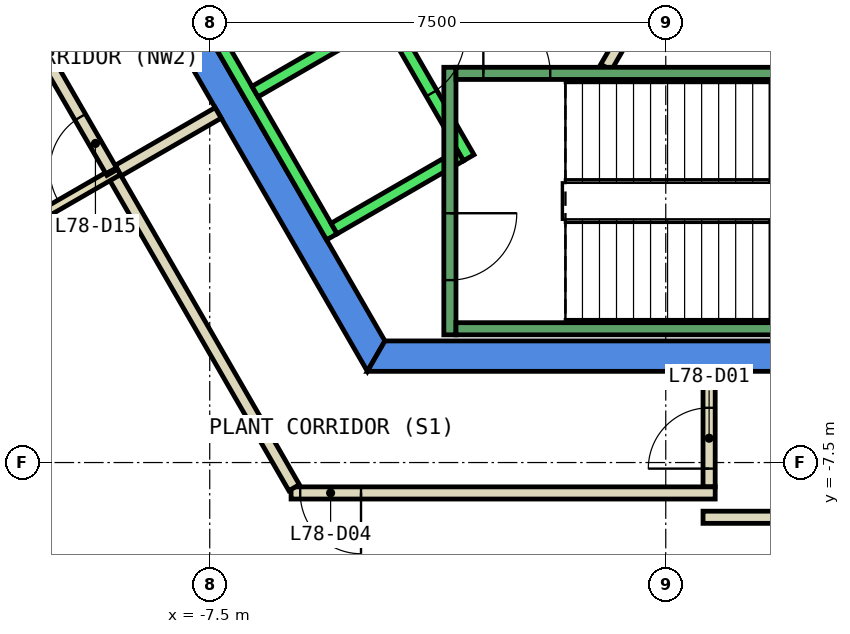
"""IFC4 building model, lengths in metres.
Left out: names, types, materials, properties, quantities, classifications, styles, units other than length and angle.
Written with IfcOpenShell. Run it as: python <this file> out.ifc"""

import sys

from ifc_helpers import new_model, si_unit, direction, frame, frame_2d, origin, place, context, subcontext, project, spatial, polyline, rectangle, outline, extrude, element, fill, save


model = new_model("IFC4")
c1 = context("Model", 3, precision=1e-05, world=origin(), true_north=direction((0.0, 1.0)))
c2 = subcontext(c1, "Body", "Model", "MODEL_VIEW")
j1 = project(units=[si_unit("LENGTHUNIT", "METRE"), si_unit("PLANEANGLEUNIT", "RADIAN")], contexts=[c1])
p1 = place(None, origin())
s1 = spatial("IfcSite", under=j1, at=p1, CompositionType="ELEMENT")
p2 = place(p1, origin())
s2 = spatial("IfcBuilding", under=s1, at=p2, CompositionType="ELEMENT")
p3 = place(p2, frame((0.0, 0.0, 331.4)))
s3 = spatial("IfcBuildingStorey", under=s2, at=p3, CompositionType="ELEMENT", Elevation=331.4)
p4 = place(p3, frame((0.0, 0.0, -0.45)))
e1 = element("IfcWall", 1, at=p4, inside=s3, PredefinedType="SHEAR", context=c2, shape_type="SweptSolid", body=[
    extrude(outline(polyline([(-9.815, 2.5), (-4.907, -6.0), (-4.619, -5.5), (-9.238, 2.5), (-9.815, 2.5)])), origin(), (0.0, 0.0, 1.0), 4.6),
])
p5 = place(p3, frame((0.0, 0.0, -0.45)))
e2 = element("IfcWall", 2, at=p5, inside=s3, PredefinedType="SHEAR", context=c2, shape_type="SweptSolid", body=[
    extrude(outline(polyline([(3.75, -6.0), (3.75, -5.5), (-4.619, -5.5), (-4.907, -6.0), (3.75, -6.0)])), origin(), (0.0, 0.0, 1.0), 4.6),
])
p6 = place(p3, frame((-0.982, -1.0, 0.0), z_axis=(0.0, 0.0, 1.0), x_axis=(0.50024047865, 0.865886518847, 0.0)))
e3 = element("IfcWall", 3, at=p6, inside=s3, PredefinedType="PARTITIONING", context=c2, shape_type="SweptSolid", body=[
    extrude(rectangle(XDim=1.863, YDim=0.2, at=frame_2d((0.931, 0.0))), origin(), (0.0, 0.0, 1.0), 4.15),
])
p7 = place(p3, frame((0.713, -7.9, 0.0), z_axis=(0.0, 0.0, 1.0), x_axis=(0.0, 1.0, 0.0)))
e4 = element("IfcWall", 4, at=p7, inside=s3, PredefinedType="PARTITIONING", context=c2, shape_type="SweptSolid", body=[
    extrude(rectangle(XDim=1.9, YDim=0.2, at=frame_2d((0.95, 0.0))), origin(), (0.0, 0.0, 1.0), 4.15),
])
p8 = place(p7, frame((0.3, 0.0, 0.0)))
e5 = element("IfcOpeningElement", 5, at=p8, cuts=e4, PredefinedType="OPENING", context=c2, shape_type="SweptSolid", body=[
    extrude(rectangle(XDim=1.0, YDim=2.1, at=frame_2d((0.5, 1.05))), frame((0.0, 0.11, 0.0), z_axis=(0.0, -1.0, 0.0), x_axis=(1.0, 0.0, 0.0)), (0.0, 0.0, 1.0), 0.22),
])
p9 = place(p3, frame((2.042, -8.4, 0.0), z_axis=(0.0, 0.0, 1.0), x_axis=(-1.0, 0.0, 0.0)))
e6 = element("IfcWall", 6, at=p9, inside=s3, PredefinedType="PARTITIONING", context=c2, shape_type="SweptSolid", body=[
    extrude(rectangle(XDim=1.429, YDim=0.2, at=frame_2d((0.714, 0.0))), origin(), (0.0, 0.0, 1.0), 4.15),
])
p10 = place(p3, frame((0.813, -8.0, 0.0), z_axis=(0.0, 0.0, 1.0), x_axis=(-1.0, 0.0, 0.0)))
e7 = element("IfcWall", 7, at=p10, inside=s3, PredefinedType="PARTITIONING", context=c2, shape_type="SweptSolid", body=[
    extrude(rectangle(XDim=6.975, YDim=0.2, at=frame_2d((3.488, 0.0))), origin(), (0.0, 0.0, 1.0), 4.15),
])
p11 = place(p10, frame((5.825, 0.0, 0.0)))
e8 = element("IfcOpeningElement", 8, at=p11, cuts=e7, PredefinedType="OPENING", context=c2, shape_type="SweptSolid", body=[
    extrude(rectangle(XDim=1.0, YDim=2.1, at=frame_2d((0.5, 1.05))), frame((0.0, 0.11, 0.0), z_axis=(0.0, -1.0, 0.0), x_axis=(1.0, 0.0, 0.0)), (0.0, 0.0, 1.0), 0.22),
])
p12 = place(p3, frame((-6.112, -7.913, 0.0), z_axis=(0.0, 0.0, 1.0), x_axis=(-0.499915430684, 0.866074224396, 0.0)))
e9 = element("IfcWall", 9, at=p12, inside=s3, PredefinedType="PARTITIONING", context=c2, shape_type="SweptSolid", body=[
    extrude(rectangle(XDim=5.987, YDim=0.2, at=frame_2d((2.993, 0.0))), origin(), (0.0, 0.0, 1.0), 4.15),
])
p13 = place(p3, frame((-9.006, -2.7, 0.0), z_axis=(0.0, 0.0, 1.0), x_axis=(0.865980106173, 0.500078449558, 0.0)))
e10 = element("IfcWall", 10, at=p13, inside=s3, PredefinedType="PARTITIONING", context=c2, shape_type="SweptSolid", body=[
    extrude(rectangle(XDim=1.9, YDim=0.2, at=frame_2d((0.95, 0.0))), origin(), (0.0, 0.0, 1.0), 4.15),
])
p14 = place(p3, frame((-21.68, -10.018, 0.0), z_axis=(0.0, 0.0, 1.0), x_axis=(0.865999449672, 0.500044951147, 0.0)))
e11 = element("IfcWall", 11, at=p14, inside=s3, PredefinedType="PARTITIONING", context=c2, shape_type="SweptSolid", body=[
    extrude(rectangle(XDim=14.635, YDim=0.15, at=frame_2d((7.317, 0.0))), origin(), (0.0, 0.0, 1.0), 4.15),
])
p15 = place(p3, frame((-9.105, -2.728, 0.0), z_axis=(0.0, 0.0, 1.0), x_axis=(-0.500229291894, 0.86589298157, 0.0)))
e12 = element("IfcWall", 12, at=p15, inside=s3, PredefinedType="PARTITIONING", context=c2, shape_type="SweptSolid", body=[
    extrude(rectangle(XDim=2.863, YDim=0.2, at=frame_2d((1.432, 0.0))), origin(), (0.0, 0.0, 1.0), 4.15),
])
p16 = place(p15, frame((0.049, 0.0, 0.0)))
e13 = element("IfcOpeningElement", 13, at=p16, cuts=e12, PredefinedType="OPENING", context=c2, shape_type="SweptSolid", body=[
    extrude(rectangle(XDim=1.0, YDim=2.1, at=frame_2d((0.5, 1.05))), frame((0.0, 0.11, 0.0), z_axis=(0.0, -1.0, 0.0), x_axis=(1.0, 0.0, 0.0)), (0.0, 0.0, 1.0), 0.22),
])
p17 = place(p3, frame((-5.94, 2.188, 0.0), z_axis=(0.0, 0.0, 1.0), x_axis=(0.500034260056, -0.866005622828, 0.0)))
e14 = element("IfcWall", 14, at=p17, inside=s3, PredefinedType="STANDARD", context=c2, shape_type="SweptSolid", body=[
    extrude(rectangle(XDim=5.399, YDim=0.2, at=frame_2d((2.7, 0.0))), origin(), (0.0, 0.0, 1.0), 4.15),
])
p18 = place(p17, frame((3.075, 0.0, 0.0)))
e15 = element("IfcOpeningElement", 15, at=p18, cuts=e14, PredefinedType="OPENING", context=c2, shape_type="SweptSolid", body=[
    extrude(rectangle(XDim=1.1, YDim=2.1, at=frame_2d((0.55, 1.05))), frame((0.0, 0.11, 0.0), z_axis=(0.0, -1.0, 0.0), x_axis=(1.0, 0.0, 0.0)), (0.0, 0.0, 1.0), 0.22),
])
p19 = place(p17, frame((1.225, 0.0, 0.0)))
e16 = element("IfcOpeningElement", 16, at=p19, cuts=e14, PredefinedType="OPENING", context=c2, shape_type="SweptSolid", body=[
    extrude(rectangle(XDim=1.1, YDim=2.1, at=frame_2d((0.55, 1.05))), frame((0.0, 0.11, 0.0), z_axis=(0.0, -1.0, 0.0), x_axis=(1.0, 0.0, 0.0)), (0.0, 0.0, 1.0), 0.22),
])
p20 = place(p3, frame((-8.192, 0.888, 0.0), z_axis=(0.0, 0.0, 1.0), x_axis=(0.500034260056, -0.866005622828, 0.0)))
e17 = element("IfcWall", 17, at=p20, inside=s3, PredefinedType="STANDARD", context=c2, shape_type="SweptSolid", body=[
    extrude(rectangle(XDim=5.399, YDim=0.2, at=frame_2d((2.7, 0.0))), origin(), (0.0, 0.0, 1.0), 4.15),
])
p21 = place(p3, frame((-4.677, -0.2, 0.0), z_axis=(0.0, 0.0, 1.0), x_axis=(-0.865973769406, -0.500089422704, 0.0)))
e18 = element("IfcWall", 18, at=p21, inside=s3, PredefinedType="STANDARD", context=c2, shape_type="SweptSolid", body=[
    extrude(rectangle(XDim=2.399, YDim=0.2, at=frame_2d((1.2, 0.0))), origin(), (0.0, 0.0, 1.0), 4.15),
])
p22 = place(p3, frame((-3.377, -2.452, 0.0), z_axis=(0.0, 0.0, 1.0), x_axis=(-0.865955154139, -0.50012165622, 0.0)))
e19 = element("IfcWall", 19, at=p22, inside=s3, PredefinedType="STANDARD", context=c2, shape_type="SweptSolid", body=[
    extrude(rectangle(XDim=2.4, YDim=0.2, at=frame_2d((1.2, 0.0))), origin(), (0.0, 0.0, 1.0), 4.15),
])
p23 = place(p3, frame((-3.55, -1.0, 0.0), z_axis=(0.0, 0.0, 1.0), x_axis=(0.0, -1.0, 0.0)))
e20 = element("IfcWall", 20, at=p23, inside=s3, PredefinedType="STANDARD", context=c2, shape_type="SweptSolid", body=[
    extrude(rectangle(XDim=4.4, YDim=0.2, at=frame_2d((2.2, 0.0))), origin(), (0.0, 0.0, 1.0), 4.15),
])
p24 = place(p23, frame((2.4, 0.0, 0.0)))
e21 = element("IfcOpeningElement", 21, at=p24, cuts=e20, PredefinedType="OPENING", context=c2, shape_type="SweptSolid", body=[
    extrude(rectangle(XDim=1.1, YDim=2.2, at=frame_2d((0.55, 1.1))), frame((0.0, 0.11, 0.0), z_axis=(0.0, -1.0, 0.0), x_axis=(1.0, 0.0, 0.0)), (0.0, 0.0, 1.0), 0.22),
])
p25 = place(p3, frame((-3.45, -1.1, 0.0), z_axis=(0.0, 0.0, 1.0), x_axis=(1.0, 0.0, 0.0)))
e22 = element("IfcWall", 22, at=p25, inside=s3, PredefinedType="STANDARD", context=c2, shape_type="SweptSolid", body=[
    extrude(rectangle(XDim=6.9, YDim=0.2, at=frame_2d((3.45, 0.0))), origin(), (0.0, 0.0, 1.0), 4.15),
])
p26 = place(p25, frame((0.45, 0.0, 0.0)))
e23 = element("IfcOpeningElement", 23, at=p26, cuts=e22, PredefinedType="OPENING", context=c2, shape_type="SweptSolid", body=[
    extrude(rectangle(XDim=1.1, YDim=2.2, at=frame_2d((0.55, 1.1))), frame((0.0, 0.11, 0.0), z_axis=(0.0, -1.0, 0.0), x_axis=(1.0, 0.0, 0.0)), (0.0, 0.0, 1.0), 0.22),
])
p27 = place(p3, frame((-3.45, -5.3, 0.0), z_axis=(0.0, 0.0, 1.0), x_axis=(1.0, 0.0, 0.0)))
e24 = element("IfcWall", 24, at=p27, inside=s3, PredefinedType="STANDARD", context=c2, shape_type="SweptSolid", body=[
    extrude(rectangle(XDim=6.9, YDim=0.2, at=frame_2d((3.45, 0.0))), origin(), (0.0, 0.0, 1.0), 4.15),
])
p28 = place(p8, origin())
e25 = element("IfcDoor", 25, at=p28, inside=s3, OperationType="SINGLE_SWING_LEFT", PredefinedType="DOOR", context=c2, shape_type="SweptSolid", body=[
    extrude(rectangle(XDim=1.0, YDim=2.1, at=frame_2d((0.5, 1.05))), frame((0.0, 0.025, 0.0), z_axis=(0.0, -1.0, 0.0), x_axis=(1.0, 0.0, 0.0)), (0.0, 0.0, 1.0), 0.05),
])
fill(e5, e25)
p29 = place(p11, origin())
e26 = element("IfcDoor", 26, at=p29, inside=s3, OperationType="SINGLE_SWING_RIGHT", PredefinedType="DOOR", context=c2, shape_type="SweptSolid", body=[
    extrude(rectangle(XDim=1.0, YDim=2.1, at=frame_2d((0.5, 1.05))), frame((0.0, 0.025, 0.0), z_axis=(0.0, -1.0, 0.0), x_axis=(1.0, 0.0, 0.0)), (0.0, 0.0, 1.0), 0.05),
])
fill(e8, e26)
p30 = place(p16, origin())
e27 = element("IfcDoor", 27, at=p30, inside=s3, OperationType="SINGLE_SWING_LEFT", PredefinedType="DOOR", context=c2, shape_type="SweptSolid", body=[
    extrude(rectangle(XDim=1.0, YDim=2.1, at=frame_2d((0.5, 1.05))), frame((0.0, 0.025, 0.0), z_axis=(0.0, -1.0, 0.0), x_axis=(1.0, 0.0, 0.0)), (0.0, 0.0, 1.0), 0.05),
])
fill(e13, e27)
p31 = place(p18, origin())
e28 = element("IfcDoor", 28, at=p31, inside=s3, OperationType="SLIDING_TO_LEFT", PredefinedType="DOOR", context=c2, shape_type="SweptSolid", body=[
    extrude(rectangle(XDim=1.1, YDim=2.1, at=frame_2d((0.55, 1.05))), frame((0.0, 0.025, 0.0), z_axis=(0.0, -1.0, 0.0), x_axis=(1.0, 0.0, 0.0)), (0.0, 0.0, 1.0), 0.05),
])
fill(e15, e28)
p32 = place(p26, origin())
e29 = element("IfcDoor", 29, at=p32, inside=s3, OperationType="SINGLE_SWING_LEFT", PredefinedType="DOOR", context=c2, shape_type="SweptSolid", body=[
    extrude(rectangle(XDim=1.1, YDim=2.2, at=frame_2d((0.55, 1.1))), frame((0.0, 0.025, 0.0), z_axis=(0.0, -1.0, 0.0), x_axis=(1.0, 0.0, 0.0)), (0.0, 0.0, 1.0), 0.05),
])
fill(e23, e29)
p33 = place(p24, origin())
e30 = element("IfcDoor", 30, at=p33, inside=s3, OperationType="SINGLE_SWING_LEFT", PredefinedType="DOOR", context=c2, shape_type="SweptSolid", body=[
    extrude(rectangle(XDim=1.1, YDim=2.2, at=frame_2d((0.55, 1.1))), frame((0.0, 0.025, 0.0), z_axis=(0.0, -1.0, 0.0), x_axis=(1.0, 0.0, 0.0)), (0.0, 0.0, 1.0), 0.05),
])
fill(e21, e30)
save(model, sys.argv[1])
